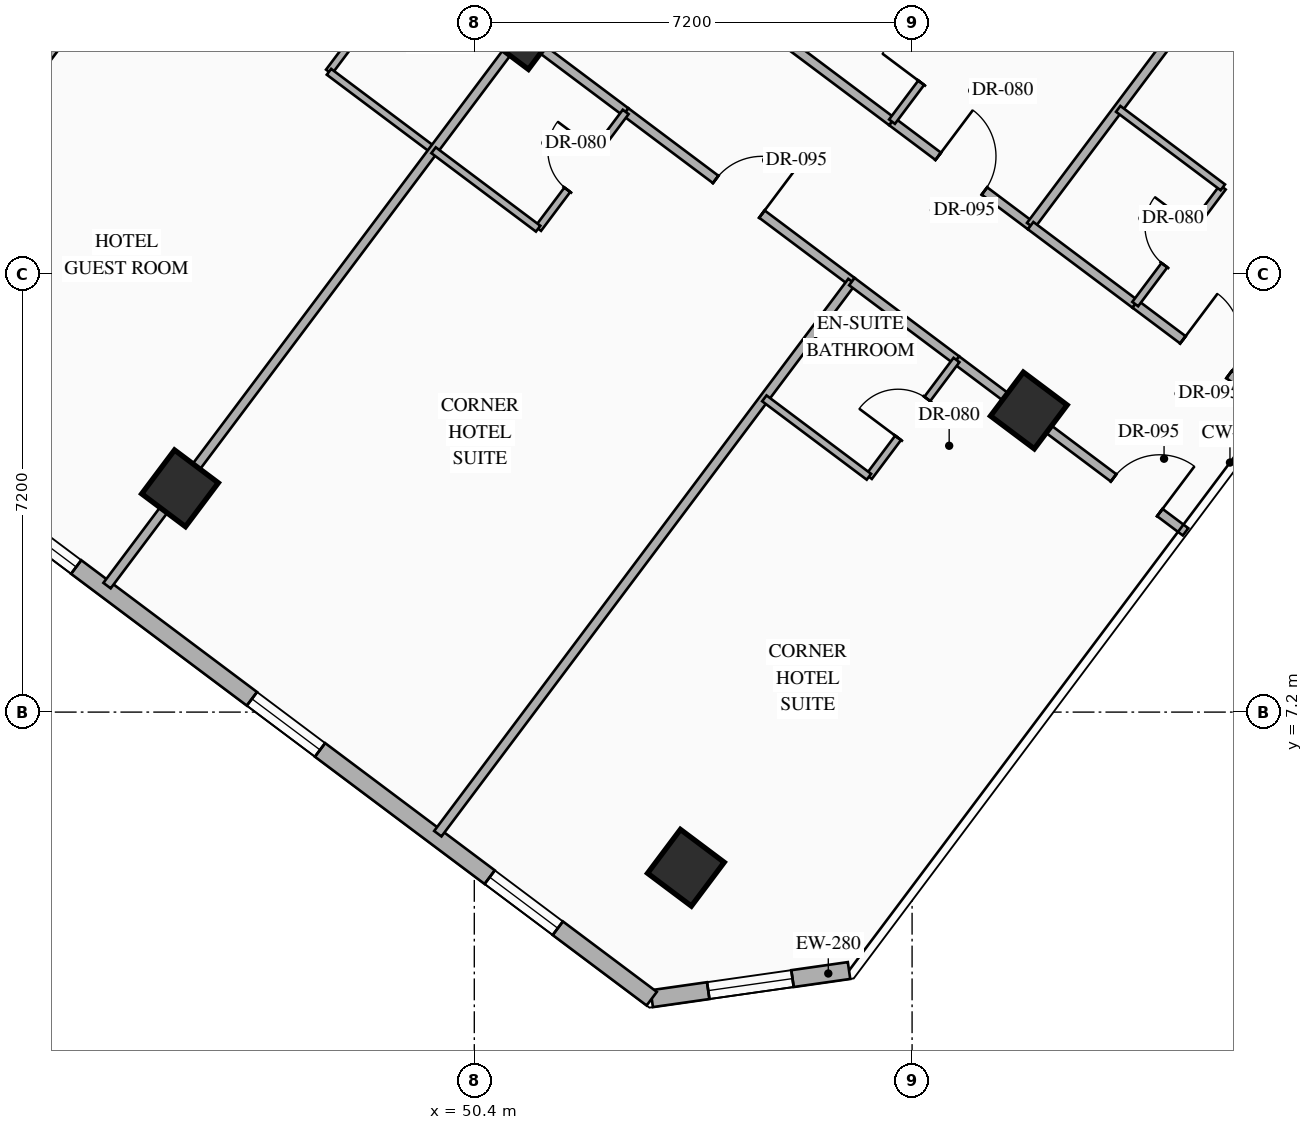
"""IFC4 building model, lengths in metres.
Left out: names, types, materials, properties, quantities, classifications, styles, units other than length and angle.
Written with IfcOpenShell. Run it as: python <this file> out.ifc"""

import sys

from ifc_helpers import new_model, si_unit, direction, frame, frame_2d, origin, origin_2d, place, context, subcontext, project, spatial, rectangle, hollow_rectangle, extrude, element, fill, save


model = new_model("IFC4")
c1 = context("Model", 3, precision=1e-05, world=origin(), true_north=direction((0.0, 1.0)))
c2 = subcontext(c1, "Body", "Model", "MODEL_VIEW")
j1 = project(units=[si_unit("LENGTHUNIT", "METRE"), si_unit("PLANEANGLEUNIT", "RADIAN")], contexts=[c1])
p1 = place(None, origin())
s1 = spatial("IfcSite", under=j1, at=p1, CompositionType="ELEMENT")
p2 = place(p1, origin())
s2 = spatial("IfcBuilding", under=s1, at=p2, CompositionType="ELEMENT")
p3 = place(p2, frame((0.0, 0.0, 74.6)))
s3 = spatial("IfcBuildingStorey", under=s2, at=p3, CompositionType="ELEMENT", Elevation=74.6)
for number, where, z_axis, x_axis in (
    (1, (45.56, 10.88, 0.0), (0.0, 0.0, 1.0), (0.8, -0.6, 0.0)),
    (2, (51.2, 18.4, 0.0), (0.0, 0.0, 1.0), (0.8, -0.6, 0.0)),
    (3, (53.88, 4.64, 0.0), (0.0, 0.0, 1.0), (0.8, -0.6, 0.0)),
    (4, (59.52, 12.16, 0.0), (0.0, 0.0, 1.0), (0.8, -0.6, 0.0)),
):
    element("IfcColumn", number, at=place(p3, frame(where, z_axis=z_axis, x_axis=x_axis)), inside=s3, PredefinedType="COLUMN", context=c2, shape_type="SweptSolid", body=[
        extrude(hollow_rectangle(XDim=0.9, YDim=0.9, WallThickness=0.036, at=origin_2d()), origin(), (0.0, 0.0, 1.0), 3.35),
    ])
p4 = place(p3, frame((56.563, 2.95, 0.0), z_axis=(0.0, 0.0, 1.0), x_axis=(-0.989977778067, -0.141223223777, 0.0)))
e5 = element("IfcWall", 5, at=p4, inside=s3, PredefinedType="STANDARD", context=c2, shape_type="SweptSolid", body=[
    extrude(rectangle(XDim=3.278, YDim=0.28, at=frame_2d((1.639, 0.0))), origin(), (0.0, 0.0, 1.0), 3.13),
])
p5 = place(p4, frame((0.939, 0.0, 0.85)))
e6 = element("IfcOpeningElement", 6, at=p5, cuts=e5, PredefinedType="OPENING", context=c2, shape_type="SweptSolid", body=[
    extrude(rectangle(XDim=1.4, YDim=1.8, at=frame_2d((0.7, 0.9))), frame((0.0, 0.15, 0.0), z_axis=(0.0, -1.0, 0.0), x_axis=(1.0, 0.0, 0.0)), (0.0, 0.0, 1.0), 0.3),
])
p6 = place(p3, frame((53.318, 2.487, 0.0), z_axis=(0.0, 0.0, 1.0), x_axis=(-0.800004174678, 0.599994433723, 0.0)))
e7 = element("IfcWall", 7, at=p6, inside=s3, PredefinedType="STANDARD", context=c2, shape_type="SweptSolid", body=[
    extrude(rectangle(XDim=35.089, YDim=0.28, at=frame_2d((17.544, 0.0))), origin(), (0.0, 0.0, 1.0), 3.13),
])
p7 = place(p6, frame((1.931, 0.0, 0.85)))
e8 = element("IfcOpeningElement", 8, at=p7, cuts=e7, PredefinedType="OPENING", context=c2, shape_type="SweptSolid", body=[
    extrude(rectangle(XDim=1.4, YDim=1.8, at=frame_2d((0.7, 0.9))), frame((0.0, 0.15, 0.0), z_axis=(0.0, -1.0, 0.0), x_axis=(1.0, 0.0, 0.0)), (0.0, 0.0, 1.0), 0.3),
])
p8 = place(p6, frame((6.819, 0.0, 0.85)))
e9 = element("IfcOpeningElement", 9, at=p8, cuts=e7, PredefinedType="OPENING", context=c2, shape_type="SweptSolid", body=[
    extrude(rectangle(XDim=1.4, YDim=1.8, at=frame_2d((0.7, 0.9))), frame((0.0, 0.15, 0.0), z_axis=(0.0, -1.0, 0.0), x_axis=(1.0, 0.0, 0.0)), (0.0, 0.0, 1.0), 0.3),
])
p9 = place(p6, frame((11.832, 0.0, 0.85)))
e10 = element("IfcOpeningElement", 10, at=p9, cuts=e7, PredefinedType="OPENING", context=c2, shape_type="SweptSolid", body=[
    extrude(rectangle(XDim=1.4, YDim=1.8, at=frame_2d((0.7, 0.9))), frame((0.0, 0.15, 0.0), z_axis=(0.0, -1.0, 0.0), x_axis=(1.0, 0.0, 0.0)), (0.0, 0.0, 1.0), 0.3),
])
p10 = place(p6, frame((17.647, 0.0, 0.85)))
e11 = element("IfcOpeningElement", 11, at=p10, cuts=e7, PredefinedType="OPENING", context=c2, shape_type="SweptSolid", body=[
    extrude(rectangle(XDim=1.4, YDim=1.8, at=frame_2d((0.7, 0.9))), frame((0.0, 0.15, 0.0), z_axis=(0.0, -1.0, 0.0), x_axis=(1.0, 0.0, 0.0)), (0.0, 0.0, 1.0), 0.3),
])
p11 = place(p6, frame((21.857, 0.0, 0.85)))
e12 = element("IfcOpeningElement", 12, at=p11, cuts=e7, PredefinedType="OPENING", context=c2, shape_type="SweptSolid", body=[
    extrude(rectangle(XDim=1.4, YDim=1.8, at=frame_2d((0.7, 0.9))), frame((0.0, 0.15, 0.0), z_axis=(0.0, -1.0, 0.0), x_axis=(1.0, 0.0, 0.0)), (0.0, 0.0, 1.0), 0.3),
])
p12 = place(p6, frame((26.87, 0.0, 0.85)))
e13 = element("IfcOpeningElement", 13, at=p12, cuts=e7, PredefinedType="OPENING", context=c2, shape_type="SweptSolid", body=[
    extrude(rectangle(XDim=1.4, YDim=1.8, at=frame_2d((0.7, 0.9))), frame((0.0, 0.15, 0.0), z_axis=(0.0, -1.0, 0.0), x_axis=(1.0, 0.0, 0.0)), (0.0, 0.0, 1.0), 0.3),
])
p13 = place(p6, frame((31.757, 0.0, 0.85)))
e14 = element("IfcOpeningElement", 14, at=p13, cuts=e7, PredefinedType="OPENING", context=c2, shape_type="SweptSolid", body=[
    extrude(rectangle(XDim=1.4, YDim=1.8, at=frame_2d((0.7, 0.9))), frame((0.0, 0.15, 0.0), z_axis=(0.0, -1.0, 0.0), x_axis=(1.0, 0.0, 0.0)), (0.0, 0.0, 1.0), 0.3),
])
p14 = place(p3, frame((39.464, 12.752, 0.0), z_axis=(0.0, 0.0, 1.0), x_axis=(0.6, 0.8, 0.0)))
e15 = element("IfcWall", 15, at=p14, inside=s3, PredefinedType="PARTITIONING", context=c2, shape_type="SweptSolid", body=[
    extrude(rectangle(XDim=11.51, YDim=0.15, at=frame_2d((5.755, 0.0))), origin(), (0.0, 0.0, 1.0), 3.13),
])
p15 = place(p3, frame((55.55, 18.2, 0.0), z_axis=(0.0, 0.0, 1.0), x_axis=(0.79998637334, -0.60001816845, 0.0)))
e16 = element("IfcWall", 16, at=p15, inside=s3, PredefinedType="PARTITIONING", context=c2, shape_type="SweptSolid", body=[
    extrude(rectangle(XDim=2.15, YDim=0.15, at=frame_2d((1.075, 0.0))), origin(), (0.0, 0.0, 1.0), 2.775),
])
p16 = place(p3, frame((57.27, 16.91, 0.0), z_axis=(0.0, 0.0, 1.0), x_axis=(0.800010279488, -0.599986293772, 0.0)))
e17 = element("IfcWall", 17, at=p16, inside=s3, PredefinedType="PARTITIONING", context=c2, shape_type="SweptSolid", body=[
    extrude(rectangle(XDim=2.85, YDim=0.15, at=frame_2d((1.425, 0.0))), origin(), (0.0, 0.0, 1.0), 2.775),
])
p17 = place(p16, frame((0.95, 0.0, 0.0)))
e18 = element("IfcOpeningElement", 18, at=p17, cuts=e17, PredefinedType="OPENING", context=c2, shape_type="SweptSolid", body=[
    extrude(rectangle(XDim=0.95, YDim=2.15, at=frame_2d((0.475, 1.075))), frame((0.0, 0.085, 0.0), z_axis=(0.0, -1.0, 0.0), x_axis=(1.0, 0.0, 0.0)), (0.0, 0.0, 1.0), 0.17),
])
p18 = place(p3, frame((57.27, 16.91, 0.0), z_axis=(0.0, 0.0, 1.0), x_axis=(0.599951172744, 0.800036618114, 0.0)))
e19 = element("IfcWall", 19, at=p18, inside=s3, PredefinedType="PARTITIONING", context=c2, shape_type="SweptSolid", body=[
    extrude(rectangle(XDim=2.4, YDim=0.12, at=frame_2d((1.2, 0.0))), origin(), (0.0, 0.0, 1.0), 3.13),
])
p19 = place(p18, frame((0.8, 0.0, 0.0)))
e20 = element("IfcOpeningElement", 20, at=p19, cuts=e19, PredefinedType="OPENING", context=c2, shape_type="SweptSolid", body=[
    extrude(rectangle(XDim=0.8, YDim=2.06, at=frame_2d((0.4, 1.03))), frame((0.0, 0.07, 0.0), z_axis=(0.0, -1.0, 0.0), x_axis=(1.0, 0.0, 0.0)), (0.0, 0.0, 1.0), 0.14),
])
p20 = place(p3, frame((59.55, 15.2, 0.0), z_axis=(0.0, 0.0, 1.0), x_axis=(0.599996617946, 0.80000253653, 0.0)))
e21 = element("IfcWall", 21, at=p20, inside=s3, PredefinedType="PARTITIONING", context=c2, shape_type="SweptSolid", body=[
    extrude(rectangle(XDim=11.55, YDim=0.15, at=frame_2d((5.775, 0.0))), origin(), (0.0, 0.0, 1.0), 3.13),
])
p21 = place(p3, frame((59.55, 15.2, 0.0), z_axis=(0.0, 0.0, 1.0), x_axis=(0.79998637334, -0.60001816845, 0.0)))
e22 = element("IfcWall", 22, at=p21, inside=s3, PredefinedType="PARTITIONING", context=c2, shape_type="SweptSolid", body=[
    extrude(rectangle(XDim=2.15, YDim=0.15, at=frame_2d((1.075, 0.0))), origin(), (0.0, 0.0, 1.0), 2.775),
])
p22 = place(p3, frame((61.27, 13.91, 0.0), z_axis=(0.0, 0.0, 1.0), x_axis=(0.800010068184, -0.59998657552, 0.0)))
e23 = element("IfcWall", 23, at=p22, inside=s3, PredefinedType="PARTITIONING", context=c2, shape_type="SweptSolid", body=[
    extrude(rectangle(XDim=2.91, YDim=0.15, at=frame_2d((1.455, 0.0))), origin(), (0.0, 0.0, 1.0), 3.13),
])
p23 = place(p22, frame((0.98, 0.0, 0.0)))
e24 = element("IfcOpeningElement", 24, at=p23, cuts=e23, PredefinedType="OPENING", context=c2, shape_type="SweptSolid", body=[
    extrude(rectangle(XDim=0.95, YDim=2.15, at=frame_2d((0.475, 1.075))), frame((0.0, 0.085, 0.0), z_axis=(0.0, -1.0, 0.0), x_axis=(1.0, 0.0, 0.0)), (0.0, 0.0, 1.0), 0.17),
])
p24 = place(p3, frame((61.27, 13.91, 0.0), z_axis=(0.0, 0.0, 1.0), x_axis=(0.599951172744, 0.800036618114, 0.0)))
e25 = element("IfcWall", 25, at=p24, inside=s3, PredefinedType="PARTITIONING", context=c2, shape_type="SweptSolid", body=[
    extrude(rectangle(XDim=2.4, YDim=0.12, at=frame_2d((1.2, 0.0))), origin(), (0.0, 0.0, 1.0), 3.13),
])
p25 = place(p24, frame((0.8, 0.0, 0.0)))
e26 = element("IfcOpeningElement", 26, at=p25, cuts=e25, PredefinedType="OPENING", context=c2, shape_type="SweptSolid", body=[
    extrude(rectangle(XDim=0.8, YDim=2.06, at=frame_2d((0.4, 1.03))), frame((0.0, 0.07, 0.0), z_axis=(0.0, -1.0, 0.0), x_axis=(1.0, 0.0, 0.0)), (0.0, 0.0, 1.0), 0.14),
])
p26 = place(p3, frame((60.99, 17.12, 0.0), z_axis=(0.0, 0.0, 1.0), x_axis=(0.79998637334, -0.60001816845, 0.0)))
e27 = element("IfcWall", 27, at=p26, inside=s3, PredefinedType="PARTITIONING", context=c2, shape_type="SweptSolid", body=[
    extrude(rectangle(XDim=2.15, YDim=0.12, at=frame_2d((1.075, 0.0))), origin(), (0.0, 0.0, 1.0), 3.13),
])
p27 = place(p3, frame((48.01, 17.73, 0.0), z_axis=(0.0, 0.0, 1.0), x_axis=(0.6, 0.8, 0.0)))
e28 = element("IfcWall", 28, at=p27, inside=s3, PredefinedType="PARTITIONING", context=c2, shape_type="SweptSolid", body=[
    extrude(rectangle(XDim=2.4, YDim=0.12, at=frame_2d((1.2, 0.0))), origin(), (0.0, 0.0, 1.0), 3.13),
])
p28 = place(p27, frame((0.8, 0.0, 0.0)))
e29 = element("IfcOpeningElement", 29, at=p28, cuts=e28, PredefinedType="OPENING", context=c2, shape_type="SweptSolid", body=[
    extrude(rectangle(XDim=0.8, YDim=2.06, at=frame_2d((0.4, 1.03))), frame((0.0, 0.07, 0.0), z_axis=(0.0, -1.0, 0.0), x_axis=(1.0, 0.0, 0.0)), (0.0, 0.0, 1.0), 0.14),
])
p29 = place(p3, frame((48.01, 17.73, 0.0), z_axis=(0.0, 0.0, 1.0), x_axis=(0.79998637334, -0.60001816845, 0.0)))
e30 = element("IfcWall", 30, at=p29, inside=s3, PredefinedType="PARTITIONING", context=c2, shape_type="SweptSolid", body=[
    extrude(rectangle(XDim=2.15, YDim=0.12, at=frame_2d((1.075, 0.0))), origin(), (0.0, 0.0, 1.0), 3.13),
])
p30 = place(p3, frame((44.36, 9.28, 0.0), z_axis=(0.0, 0.0, 1.0), x_axis=(0.599986233332, 0.800010324816, 0.0)))
e31 = element("IfcWall", 31, at=p30, inside=s3, PredefinedType="PARTITIONING", context=c2, shape_type="SweptSolid", body=[
    extrude(rectangle(XDim=11.35, YDim=0.15, at=frame_2d((5.675, 0.0))), origin(), (0.0, 0.0, 1.0), 2.425),
])
p31 = place(p3, frame((51.17, 18.36, 0.0), z_axis=(0.0, 0.0, 1.0), x_axis=(0.79998637334, -0.60001816845, 0.0)))
e32 = element("IfcWall", 32, at=p31, inside=s3, PredefinedType="PARTITIONING", context=c2, shape_type="SweptSolid", body=[
    extrude(rectangle(XDim=2.15, YDim=0.15, at=frame_2d((1.075, 0.0))), origin(), (0.0, 0.0, 1.0), 2.425),
])
p32 = place(p3, frame((52.89, 17.07, 0.0), z_axis=(0.0, 0.0, 1.0), x_axis=(0.800012600101, -0.599983199498, 0.0)))
e33 = element("IfcWall", 33, at=p32, inside=s3, PredefinedType="PARTITIONING", context=c2, shape_type="SweptSolid", body=[
    extrude(rectangle(XDim=4.65, YDim=0.15, at=frame_2d((2.325, 0.0))), origin(), (0.0, 0.0, 1.0), 2.425),
])
p33 = place(p32, frame((1.85, 0.0, 0.0)))
e34 = element("IfcOpeningElement", 34, at=p33, cuts=e33, PredefinedType="OPENING", context=c2, shape_type="SweptSolid", body=[
    extrude(rectangle(XDim=0.95, YDim=2.15, at=frame_2d((0.475, 1.075))), frame((0.0, 0.085, 0.0), z_axis=(0.0, -1.0, 0.0), x_axis=(1.0, 0.0, 0.0)), (0.0, 0.0, 1.0), 0.17),
])
p34 = place(p3, frame((51.45, 15.15, 0.0), z_axis=(0.0, 0.0, 1.0), x_axis=(0.599951172744, 0.800036618114, 0.0)))
e35 = element("IfcWall", 35, at=p34, inside=s3, PredefinedType="PARTITIONING", context=c2, shape_type="SweptSolid", body=[
    extrude(rectangle(XDim=2.4, YDim=0.12, at=frame_2d((1.2, 0.0))), origin(), (0.0, 0.0, 1.0), 3.13),
])
p35 = place(p34, frame((0.8, 0.0, 0.0)))
e36 = element("IfcOpeningElement", 36, at=p35, cuts=e35, PredefinedType="OPENING", context=c2, shape_type="SweptSolid", body=[
    extrude(rectangle(XDim=0.8, YDim=2.06, at=frame_2d((0.4, 1.03))), frame((0.0, 0.07, 0.0), z_axis=(0.0, -1.0, 0.0), x_axis=(1.0, 0.0, 0.0)), (0.0, 0.0, 1.0), 0.14),
])
p36 = place(p3, frame((49.73, 16.44, 0.0), z_axis=(0.0, 0.0, 1.0), x_axis=(0.79998637334, -0.60001816845, 0.0)))
e37 = element("IfcWall", 37, at=p36, inside=s3, PredefinedType="PARTITIONING", context=c2, shape_type="SweptSolid", body=[
    extrude(rectangle(XDim=2.15, YDim=0.12, at=frame_2d((1.075, 0.0))), origin(), (0.0, 0.0, 1.0), 3.13),
])
p37 = place(p3, frame((49.8, 5.2, 0.0), z_axis=(0.0, 0.0, 1.0), x_axis=(0.6, 0.8, 0.0)))
e38 = element("IfcWall", 38, at=p37, inside=s3, PredefinedType="PARTITIONING", context=c2, shape_type="SweptSolid", body=[
    extrude(rectangle(XDim=11.35, YDim=0.15, at=frame_2d((5.675, 0.0))), origin(), (0.0, 0.0, 1.0), 3.13),
])
p38 = place(p3, frame((56.61, 14.28, 0.0), z_axis=(0.0, 0.0, 1.0), x_axis=(0.79998637334, -0.60001816845, 0.0)))
e39 = element("IfcWall", 39, at=p38, inside=s3, PredefinedType="PARTITIONING", context=c2, shape_type="SweptSolid", body=[
    extrude(rectangle(XDim=2.15, YDim=0.15, at=frame_2d((1.075, 0.0))), origin(), (0.0, 0.0, 1.0), 2.425),
])
p39 = place(p3, frame((58.33, 12.99, 0.0), z_axis=(0.0, 0.0, 1.0), x_axis=(0.799993779569, -0.600008293819, 0.0)))
e40 = element("IfcWall", 40, at=p39, inside=s3, PredefinedType="PARTITIONING", context=c2, shape_type="SweptSolid", body=[
    extrude(rectangle(XDim=4.71, YDim=0.15, at=frame_2d((2.355, 0.0))), origin(), (0.0, 0.0, 1.0), 2.425),
])
p40 = place(p39, frame((3.23, 0.0, 0.0)))
e41 = element("IfcOpeningElement", 41, at=p40, cuts=e40, PredefinedType="OPENING", context=c2, shape_type="SweptSolid", body=[
    extrude(rectangle(XDim=0.95, YDim=2.15, at=frame_2d((0.475, 1.075))), frame((0.0, 0.085, 0.0), z_axis=(0.0, -1.0, 0.0), x_axis=(1.0, 0.0, 0.0)), (0.0, 0.0, 1.0), 0.17),
])
p41 = place(p3, frame((56.89, 11.07, 0.0), z_axis=(0.0, 0.0, 1.0), x_axis=(0.600065100855, 0.79995117022, 0.0)))
e42 = element("IfcWall", 42, at=p41, inside=s3, PredefinedType="PARTITIONING", context=c2, shape_type="SweptSolid", body=[
    extrude(rectangle(XDim=2.4, YDim=0.12, at=frame_2d((1.2, 0.0))), origin(), (0.0, 0.0, 1.0), 3.13),
])
p42 = place(p41, frame((0.8, 0.0, 0.0)))
e43 = element("IfcOpeningElement", 43, at=p42, cuts=e42, PredefinedType="OPENING", context=c2, shape_type="SweptSolid", body=[
    extrude(rectangle(XDim=0.8, YDim=2.06, at=frame_2d((0.4, 1.03))), frame((0.0, 0.07, 0.0), z_axis=(0.0, -1.0, 0.0), x_axis=(1.0, 0.0, 0.0)), (0.0, 0.0, 1.0), 0.14),
])
p43 = place(p3, frame((55.17, 12.36, 0.0), z_axis=(0.0, 0.0, 1.0), x_axis=(0.79998637334, -0.60001816845, 0.0)))
e44 = element("IfcWall", 44, at=p43, inside=s3, PredefinedType="PARTITIONING", context=c2, shape_type="SweptSolid", body=[
    extrude(rectangle(XDim=2.15, YDim=0.12, at=frame_2d((1.075, 0.0))), origin(), (0.0, 0.0, 1.0), 3.13),
])
p44 = place(p5, origin())
e45 = element("IfcWindow", 45, at=p44, inside=s3, PartitioningType="SINGLE_PANEL", PredefinedType="WINDOW", context=c2, shape_type="SweptSolid", body=[
    extrude(rectangle(XDim=1.4, YDim=1.8, at=frame_2d((0.7, 0.9))), frame((0.0, 0.03, 0.0), z_axis=(0.0, -1.0, 0.0), x_axis=(1.0, 0.0, 0.0)), (0.0, 0.0, 1.0), 0.06),
])
fill(e6, e45)
p45 = place(p7, origin())
e46 = element("IfcWindow", 46, at=p45, inside=s3, PartitioningType="SINGLE_PANEL", PredefinedType="WINDOW", context=c2, shape_type="SweptSolid", body=[
    extrude(rectangle(XDim=1.4, YDim=1.8, at=frame_2d((0.7, 0.9))), frame((0.0, 0.03, 0.0), z_axis=(0.0, -1.0, 0.0), x_axis=(1.0, 0.0, 0.0)), (0.0, 0.0, 1.0), 0.06),
])
fill(e8, e46)
p46 = place(p8, origin())
e47 = element("IfcWindow", 47, at=p46, inside=s3, PartitioningType="SINGLE_PANEL", PredefinedType="WINDOW", context=c2, shape_type="SweptSolid", body=[
    extrude(rectangle(XDim=1.4, YDim=1.8, at=frame_2d((0.7, 0.9))), frame((0.0, 0.03, 0.0), z_axis=(0.0, -1.0, 0.0), x_axis=(1.0, 0.0, 0.0)), (0.0, 0.0, 1.0), 0.06),
])
fill(e9, e47)
p47 = place(p9, origin())
e48 = element("IfcWindow", 48, at=p47, inside=s3, PartitioningType="SINGLE_PANEL", PredefinedType="WINDOW", context=c2, shape_type="SweptSolid", body=[
    extrude(rectangle(XDim=1.4, YDim=1.8, at=frame_2d((0.7, 0.9))), frame((0.0, 0.03, 0.0), z_axis=(0.0, -1.0, 0.0), x_axis=(1.0, 0.0, 0.0)), (0.0, 0.0, 1.0), 0.06),
])
fill(e10, e48)
p48 = place(p17, origin())
e49 = element("IfcDoor", 49, at=p48, inside=s3, OperationType="SINGLE_SWING_LEFT", PredefinedType="DOOR", context=c2, shape_type="SweptSolid", body=[
    extrude(rectangle(XDim=0.95, YDim=2.15, at=frame_2d((0.475, 1.075))), frame((0.0, 0.025, 0.0), z_axis=(0.0, -1.0, 0.0), x_axis=(1.0, 0.0, 0.0)), (0.0, 0.0, 1.0), 0.05),
])
fill(e18, e49)
p49 = place(p19, origin())
e50 = element("IfcDoor", 50, at=p49, inside=s3, OperationType="SINGLE_SWING_LEFT", PredefinedType="DOOR", context=c2, shape_type="SweptSolid", body=[
    extrude(rectangle(XDim=0.8, YDim=2.06, at=frame_2d((0.4, 1.03))), frame((0.0, 0.025, 0.0), z_axis=(0.0, -1.0, 0.0), x_axis=(1.0, 0.0, 0.0)), (0.0, 0.0, 1.0), 0.05),
])
fill(e20, e50)
p50 = place(p23, origin())
e51 = element("IfcDoor", 51, at=p50, inside=s3, OperationType="SINGLE_SWING_LEFT", PredefinedType="DOOR", context=c2, shape_type="SweptSolid", body=[
    extrude(rectangle(XDim=0.95, YDim=2.15, at=frame_2d((0.475, 1.075))), frame((0.0, 0.025, 0.0), z_axis=(0.0, -1.0, 0.0), x_axis=(1.0, 0.0, 0.0)), (0.0, 0.0, 1.0), 0.05),
])
fill(e24, e51)
p51 = place(p25, origin())
e52 = element("IfcDoor", 52, at=p51, inside=s3, OperationType="SINGLE_SWING_RIGHT", PredefinedType="DOOR", context=c2, shape_type="SweptSolid", body=[
    extrude(rectangle(XDim=0.8, YDim=2.06, at=frame_2d((0.4, 1.03))), frame((0.0, 0.025, 0.0), z_axis=(0.0, -1.0, 0.0), x_axis=(1.0, 0.0, 0.0)), (0.0, 0.0, 1.0), 0.05),
])
fill(e26, e52)
p52 = place(p33, origin())
e53 = element("IfcDoor", 53, at=p52, inside=s3, OperationType="SINGLE_SWING_RIGHT", PredefinedType="DOOR", context=c2, shape_type="SweptSolid", body=[
    extrude(rectangle(XDim=0.95, YDim=2.15, at=frame_2d((0.475, 1.075))), frame((0.0, 0.025, 0.0), z_axis=(0.0, -1.0, 0.0), x_axis=(1.0, 0.0, 0.0)), (0.0, 0.0, 1.0), 0.05),
])
fill(e34, e53)
p53 = place(p35, origin())
e54 = element("IfcDoor", 54, at=p53, inside=s3, OperationType="SINGLE_SWING_RIGHT", PredefinedType="DOOR", context=c2, shape_type="SweptSolid", body=[
    extrude(rectangle(XDim=0.8, YDim=2.06, at=frame_2d((0.4, 1.03))), frame((0.0, 0.025, 0.0), z_axis=(0.0, -1.0, 0.0), x_axis=(1.0, 0.0, 0.0)), (0.0, 0.0, 1.0), 0.05),
])
fill(e36, e54)
p54 = place(p40, origin())
e55 = element("IfcDoor", 55, at=p54, inside=s3, OperationType="SINGLE_SWING_RIGHT", PredefinedType="DOOR", context=c2, shape_type="SweptSolid", body=[
    extrude(rectangle(XDim=0.95, YDim=2.15, at=frame_2d((0.475, 1.075))), frame((0.0, 0.025, 0.0), z_axis=(0.0, -1.0, 0.0), x_axis=(1.0, 0.0, 0.0)), (0.0, 0.0, 1.0), 0.05),
])
fill(e41, e55)
p55 = place(p42, origin())
e56 = element("IfcDoor", 56, at=p55, inside=s3, OperationType="SINGLE_SWING_LEFT", PredefinedType="DOOR", context=c2, shape_type="SweptSolid", body=[
    extrude(rectangle(XDim=0.8, YDim=2.06, at=frame_2d((0.4, 1.03))), frame((0.0, 0.025, 0.0), z_axis=(0.0, -1.0, 0.0), x_axis=(1.0, 0.0, 0.0)), (0.0, 0.0, 1.0), 0.05),
])
fill(e43, e56)
save(model, sys.argv[1])
